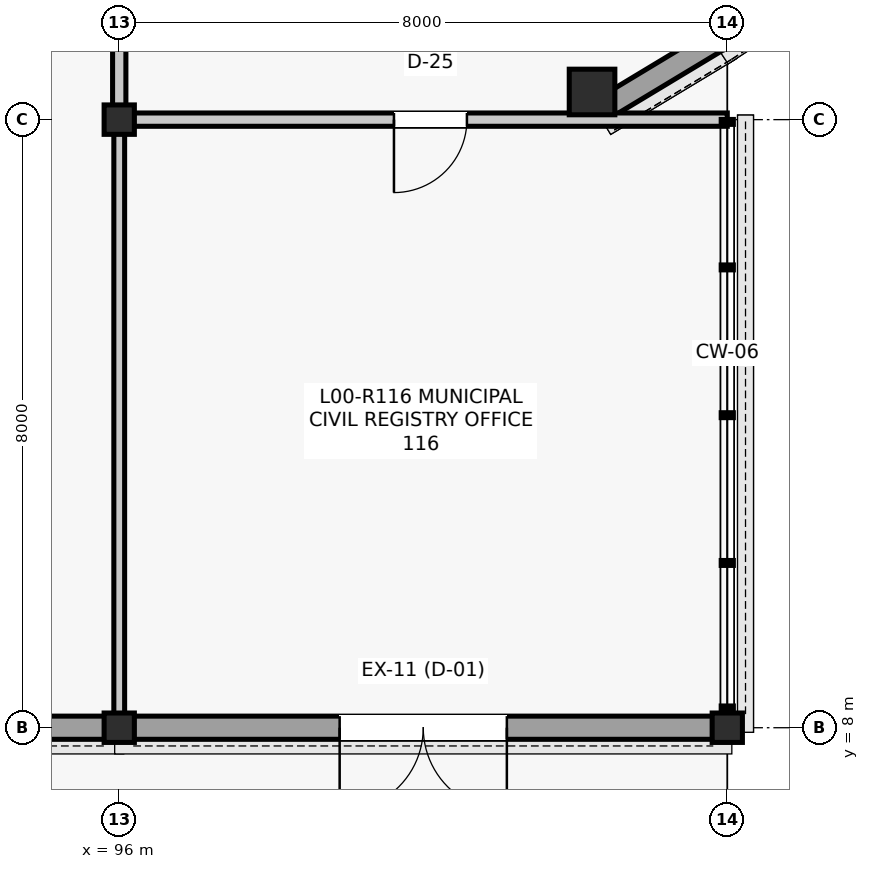
"""IFC4 building model, lengths in metres.
Left out: names, types, materials, properties, quantities, classifications, styles, units other than length and angle.
Written with IfcOpenShell. Run it as: python <this file> out.ifc"""

import sys

from ifc_helpers import new_model, si_unit, direction, frame, frame_2d, origin, origin_2d, place, context, subcontext, project, spatial, rectangle, i_section, extrude, element, fill, save


model = new_model("IFC4")
c1 = context("Model", 3, precision=1e-05, world=origin(), true_north=direction((0.0, 1.0)))
c2 = subcontext(c1, "Body", "Model", "MODEL_VIEW")
j1 = project(units=[si_unit("LENGTHUNIT", "METRE"), si_unit("PLANEANGLEUNIT", "RADIAN")], contexts=[c1])
p1 = place(None, origin())
s1 = spatial("IfcSite", under=j1, at=p1, CompositionType="ELEMENT")
p2 = place(p1, origin())
s2 = spatial("IfcBuilding", under=s1, at=p2, CompositionType="ELEMENT")
p3 = place(p2, origin())
s3 = spatial("IfcBuildingStorey", under=s2, at=p3, CompositionType="ELEMENT", Elevation=0.0)
for number, where, z_axis, x_axis in (
    (1, (96.0, 8.0, 0.0), (0.0, 0.0, 1.0), (1.0, 0.0, 0.0)),
    (2, (96.0, 16.0, 0.0), (0.0, 0.0, 1.0), (1.0, 0.0, 0.0)),
    (3, (104.0, 8.0, 0.0), (0.0, 0.0, 1.0), (1.0, 0.0, 0.0)),
):
    element("IfcColumn", number, at=place(p3, frame(where, z_axis=z_axis, x_axis=x_axis)), inside=s3, PredefinedType="COLUMN", context=c2, shape_type="SweptSolid", body=[
        extrude(i_section(OverallWidth=0.398, OverallDepth=0.387, WebThickness=0.021, FlangeThickness=0.033, FilletRadius=0.015, at=origin_2d()), origin(), (0.0, 0.0, 1.0), 5.28),
    ])
p4 = place(p3, frame((102.221, 16.364, 0.0), z_axis=(0.0, 0.0, 1.0), x_axis=(1.0, 0.0, 0.0)))
e4 = element("IfcColumn", 4, at=p4, inside=s3, PredefinedType="COLUMN", context=c2, shape_type="SweptSolid", body=[
    extrude(rectangle(XDim=0.6, YDim=0.6, at=origin_2d()), origin(), (0.0, 0.0, 1.0), 5.28),
])
p5 = place(p3, frame((102.351, 16.133, 0.0), z_axis=(0.0, 0.0, 1.0), x_axis=(0.856543302071, 0.51607516088, 0.0)))
e5 = element("IfcWall", 5, at=p5, inside=s3, PredefinedType="SOLIDWALL", context=c2, shape_type="SweptSolid", body=[
    extrude(rectangle(XDim=1.795, YDim=0.305, at=frame_2d((0.897, 0.0))), origin(), (0.0, 0.0, 1.0), 5.035),
])
p6 = place(p3, frame((88.0, 8.0, 0.0), z_axis=(0.0, 0.0, 1.0), x_axis=(1.0, 0.0, 0.0)))
e6 = element("IfcWall", 6, at=p6, inside=s3, PredefinedType="SOLIDWALL", context=c2, shape_type="SweptSolid", body=[
    extrude(rectangle(XDim=7.816, YDim=0.305, at=frame_2d((3.908, 0.0))), origin(), (0.0, 0.0, 1.0), 4.274),
])
p7 = place(p6, frame((2.708, 0.0, 0.0)))
e7 = element("IfcOpeningElement", 7, at=p7, cuts=e6, PredefinedType="OPENING", context=c2, shape_type="SweptSolid", body=[
    extrude(rectangle(XDim=2.4, YDim=2.7, at=frame_2d((1.2, 1.35))), frame((0.0, 0.162, 0.0), z_axis=(0.0, -1.0, 0.0), x_axis=(1.0, 0.0, 0.0)), (0.0, 0.0, 1.0), 0.325),
])
p8 = place(p3, frame((96.184, 8.0, 0.0), z_axis=(0.0, 0.0, 1.0), x_axis=(1.0, 0.0, 0.0)))
e8 = element("IfcWall", 8, at=p8, inside=s3, PredefinedType="SOLIDWALL", context=c2, shape_type="SweptSolid", body=[
    extrude(rectangle(XDim=7.632, YDim=0.305, at=frame_2d((3.816, 0.0))), origin(), (0.0, 0.0, 1.0), 4.679),
])
p9 = place(p8, frame((2.716, 0.0, 0.0)))
e9 = element("IfcOpeningElement", 9, at=p9, cuts=e8, PredefinedType="OPENING", context=c2, shape_type="SweptSolid", body=[
    extrude(rectangle(XDim=2.2, YDim=2.5, at=frame_2d((1.1, 1.25))), frame((0.0, 0.162, 0.0), z_axis=(0.0, -1.0, 0.0), x_axis=(1.0, 0.0, 0.0)), (0.0, 0.0, 1.0), 0.325),
])
p10 = place(p3, frame((96.0, 8.184, 0.0), z_axis=(0.0, 0.0, 1.0), x_axis=(0.0, 1.0, 0.0)))
e10 = element("IfcWall", 10, at=p10, inside=s3, PredefinedType="PARTITIONING", context=c2, shape_type="SweptSolid", body=[
    extrude(rectangle(XDim=7.633, YDim=0.142, at=frame_2d((3.816, 0.0))), origin(), (0.0, 0.0, 1.0), 5.025),
])
p11 = place(p3, frame((96.0, 16.184, 0.0), z_axis=(0.0, 0.0, 1.0), x_axis=(0.0, 1.0, 0.0)))
e11 = element("IfcWall", 11, at=p11, inside=s3, PredefinedType="PARTITIONING", context=c2, shape_type="SweptSolid", body=[
    extrude(rectangle(XDim=7.633, YDim=0.175, at=frame_2d((3.816, 0.0))), origin(), (0.0, 0.0, 1.0), 4.607),
])
p12 = place(p11, frame((2.866, 0.0, 0.0)))
e12 = element("IfcOpeningElement", 12, at=p12, cuts=e11, PredefinedType="OPENING", context=c2, shape_type="SweptSolid", body=[
    extrude(rectangle(XDim=1.9, YDim=2.38, at=frame_2d((0.95, 1.19))), frame((0.0, 0.097, 0.0), z_axis=(0.0, -1.0, 0.0), x_axis=(1.0, 0.0, 0.0)), (0.0, 0.0, 1.0), 0.195),
])
p13 = place(p3, frame((96.189, 16.0, 0.0), z_axis=(0.0, 0.0, 1.0), x_axis=(1.0, 0.0, 0.0)))
e13 = element("IfcWall", 13, at=p13, inside=s3, PredefinedType="PARTITIONING", context=c2, shape_type="SweptSolid", body=[
    extrude(rectangle(XDim=7.811, YDim=0.175, at=frame_2d((3.906, 0.0))), origin(), (0.0, 0.0, 1.0), 5.025),
])
p14 = place(p13, frame((3.426, 0.0, 0.0)))
e14 = element("IfcOpeningElement", 14, at=p14, cuts=e13, PredefinedType="OPENING", context=c2, shape_type="SweptSolid", body=[
    extrude(rectangle(XDim=0.96, YDim=2.14, at=frame_2d((0.48, 1.07))), frame((0.0, 0.097, 0.0), z_axis=(0.0, -1.0, 0.0), x_axis=(1.0, 0.0, 0.0)), (0.0, 0.0, 1.0), 0.195),
])
p15 = place(p9, frame((2.2, 0.0, 0.0), z_axis=(0.0, 0.0, 1.0), x_axis=(-1.0, 0.0, 0.0)))
e15 = element("IfcDoor", 15, at=p15, inside=s3, OperationType="DOUBLE_DOOR_SINGLE_SWING", PredefinedType="DOOR", context=c2, shape_type="SweptSolid", body=[
    extrude(rectangle(XDim=2.2, YDim=2.5, at=frame_2d((1.1, 1.25))), frame((0.0, 0.025, 0.0), z_axis=(0.0, -1.0, 0.0), x_axis=(1.0, 0.0, 0.0)), (0.0, 0.0, 1.0), 0.05),
])
fill(e9, e15)
p16 = place(p14, frame((0.96, 0.0, 0.0), z_axis=(0.0, 0.0, 1.0), x_axis=(-1.0, 0.0, 0.0)))
e16 = element("IfcDoor", 16, at=p16, inside=s3, OperationType="SINGLE_SWING_LEFT", PredefinedType="DOOR", context=c2, shape_type="SweptSolid", body=[
    extrude(rectangle(XDim=0.96, YDim=2.14, at=frame_2d((0.48, 1.07))), frame((0.0, 0.025, 0.0), z_axis=(0.0, -1.0, 0.0), x_axis=(1.0, 0.0, 0.0)), (0.0, 0.0, 1.0), 0.05),
])
fill(e14, e16)
save(model, sys.argv[1])
